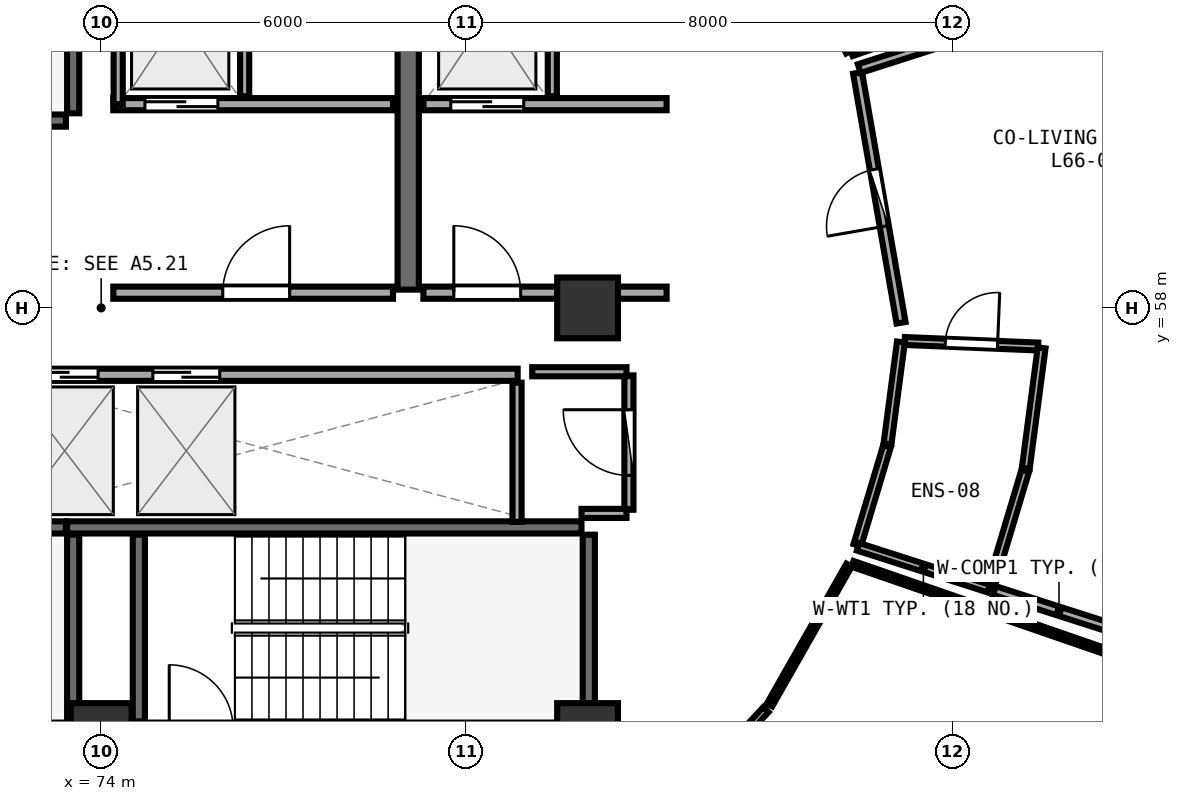
"""IFC4 building model, lengths in metres.
Left out: names, types, materials, properties, quantities, classifications, styles, units other than length and angle.
Written with IfcOpenShell. Run it as: python <this file> out.ifc"""

import sys

from ifc_helpers import new_model, si_unit, direction, frame, frame_2d, origin, origin_2d, place, context, subcontext, project, spatial, rectangle, extrude, element, fill, save


model = new_model("IFC4")
c1 = context("Model", 3, precision=1e-05, world=origin(), true_north=direction((0.0, 1.0)))
c2 = subcontext(c1, "Body", "Model", "MODEL_VIEW")
j1 = project(units=[si_unit("LENGTHUNIT", "METRE"), si_unit("PLANEANGLEUNIT", "RADIAN")], contexts=[c1])
p1 = place(None, origin())
s1 = spatial("IfcSite", under=j1, at=p1, CompositionType="ELEMENT")
p2 = place(p1, origin())
s2 = spatial("IfcBuilding", under=s1, at=p2, CompositionType="ELEMENT")
p3 = place(p2, frame((0.0, 0.0, 259.95)))
s3 = spatial("IfcBuildingStorey", under=s2, at=p3, CompositionType="ELEMENT", Elevation=259.95)
for number, where, z_axis, x_axis in (
    (1, (74.0, 51.0, 0.0), (0.0, 0.0, 1.0), (1.0, 0.0, 0.0)),
    (2, (82.0, 51.0, 0.0), (0.0, 0.0, 1.0), (1.0, 0.0, 0.0)),
    (3, (82.0, 58.0, 0.0), (0.0, 0.0, 1.0), (1.0, 0.0, 0.0)),
):
    element("IfcColumn", number, at=place(p3, frame(where, z_axis=z_axis, x_axis=x_axis)), inside=s3, PredefinedType="PILASTER", context=c2, shape_type="SweptSolid", body=[
        extrude(rectangle(XDim=1.0, YDim=1.0, at=origin_2d()), origin(), (0.0, 0.0, 1.0), 3.75),
    ])
p4 = place(p3, frame((66.26, 61.08, 0.0), z_axis=(0.0, 0.0, 1.0), x_axis=(1.0, 0.0, 0.0)))
e4 = element("IfcWall", 4, at=p4, inside=s3, PredefinedType="SHEAR", context=c2, shape_type="SweptSolid", body=[
    extrude(rectangle(XDim=7.16, YDim=0.2, at=frame_2d((3.58, 0.0))), origin(), (0.0, 0.0, 1.0), 3.49),
])
for number, where, z_axis, x_axis in (
    (5, (73.54, 61.2, 0.0), (0.0, 0.0, 1.0), (0.0, 1.0, 0.0)),
    (6, (82.02, 51.2, 0.0), (0.0, 0.0, 1.0), (0.0, 1.0, 0.0)),
):
    element("IfcWall", number, at=place(p3, frame(where, z_axis=z_axis, x_axis=x_axis)), inside=s3, PredefinedType="SHEAR", context=c2, shape_type="SweptSolid", body=[
        extrude(rectangle(XDim=3.07, YDim=0.2, at=frame_2d((1.535, 0.0))), origin(), (0.0, 0.0, 1.0), 3.49),
    ])
p5 = place(p3, frame((81.9, 54.39, 0.0), z_axis=(0.0, 0.0, 1.0), x_axis=(-1.0, 0.0, 0.0)))
e7 = element("IfcWall", 7, at=p5, inside=s3, PredefinedType="SHEAR", context=c2, shape_type="SweptSolid", body=[
    extrude(rectangle(XDim=8.46, YDim=0.2, at=frame_2d((4.23, 0.0))), origin(), (0.0, 0.0, 1.0), 3.49),
])
for number, where, z_axis, x_axis in (
    (8, (74.62, 54.27, 0.0), (0.0, 0.0, 1.0), (0.0, -1.0, 0.0)),
    (9, (73.54, 51.2, 0.0), (0.0, 0.0, 1.0), (0.0, 1.0, 0.0)),
):
    element("IfcWall", number, at=place(p3, frame(where, z_axis=z_axis, x_axis=x_axis)), inside=s3, PredefinedType="SHEAR", context=c2, shape_type="SweptSolid", body=[
        extrude(rectangle(XDim=3.07, YDim=0.2, at=frame_2d((1.535, 0.0))), origin(), (0.0, 0.0, 1.0), 3.49),
    ])
p6 = place(p3, frame((73.42, 54.39, 0.0), z_axis=(0.0, 0.0, 1.0), x_axis=(-1.0, 0.0, 0.0)))
e10 = element("IfcWall", 10, at=p6, inside=s3, PredefinedType="SHEAR", context=c2, shape_type="SweptSolid", body=[
    extrude(rectangle(XDim=7.16, YDim=0.2, at=frame_2d((3.58, 0.0))), origin(), (0.0, 0.0, 1.0), 3.49),
])
p7 = place(p3, frame((79.05, 58.3, 0.0), z_axis=(0.0, 0.0, 1.0), x_axis=(0.0, 1.0, 0.0)))
e11 = element("IfcWall", 11, at=p7, inside=s3, PredefinedType="SHEAR", context=c2, shape_type="SweptSolid", body=[
    extrude(rectangle(XDim=6.3, YDim=0.35, at=frame_2d((3.15, 0.0))), origin(), (0.0, 0.0, 1.0), 3.49),
])
p8 = place(p3, frame((74.2, 61.35, 0.0), z_axis=(0.0, 0.0, 1.0), x_axis=(1.0, 0.0, 0.0)))
e12 = element("IfcWall", 12, at=p8, inside=s3, PredefinedType="SOLIDWALL", context=c2, shape_type="SweptSolid", body=[
    extrude(rectangle(XDim=4.6, YDim=0.2, at=frame_2d((2.3, 0.0))), origin(), (0.0, 0.0, 1.0), 3.48),
])
p9 = place(p8, frame((0.52, 0.0, 0.0)))
e13 = element("IfcOpeningElement", 13, at=p9, cuts=e12, PredefinedType="OPENING", context=c2, shape_type="SweptSolid", body=[
    extrude(rectangle(XDim=1.2, YDim=2.15, at=frame_2d((0.6, 1.075))), frame((0.0, 0.11, 0.0), z_axis=(0.0, -1.0, 0.0), x_axis=(1.0, 0.0, 0.0)), (0.0, 0.0, 1.0), 0.22),
])
p10 = place(p3, frame((74.28, 61.35, 0.0), z_axis=(0.0, 0.0, 1.0), x_axis=(0.0, 1.0, 0.0)))
e14 = element("IfcWall", 14, at=p10, inside=s3, PredefinedType="PARTITIONING", context=c2, shape_type="SweptSolid", body=[
    extrude(rectangle(XDim=2.97, YDim=0.15, at=frame_2d((1.485, 0.0))), origin(), (0.0, 0.0, 1.0), 3.48),
])
p11 = place(p3, frame((76.36, 61.48, 0.0), z_axis=(0.0, 0.0, 1.0), x_axis=(0.0, 1.0, 0.0)))
e15 = element("IfcWall", 15, at=p11, inside=s3, PredefinedType="PARTITIONING", context=c2, shape_type="SweptSolid", body=[
    extrude(rectangle(XDim=2.84, YDim=0.15, at=frame_2d((1.42, 0.0))), origin(), (0.0, 0.0, 1.0), 3.48),
])
p12 = place(p3, frame((79.3, 61.35, 0.0), z_axis=(0.0, 0.0, 1.0), x_axis=(1.0, 0.0, 0.0)))
e16 = element("IfcWall", 16, at=p12, inside=s3, PredefinedType="SOLIDWALL", context=c2, shape_type="SweptSolid", body=[
    extrude(rectangle(XDim=4.0, YDim=0.2, at=frame_2d((2.0, 0.0))), origin(), (0.0, 0.0, 1.0), 2.775),
])
p13 = place(p12, frame((0.45, 0.0, 0.0)))
e17 = element("IfcOpeningElement", 17, at=p13, cuts=e16, PredefinedType="OPENING", context=c2, shape_type="SweptSolid", body=[
    extrude(rectangle(XDim=1.2, YDim=2.15, at=frame_2d((0.6, 1.075))), frame((0.0, 0.11, 0.0), z_axis=(0.0, -1.0, 0.0), x_axis=(1.0, 0.0, 0.0)), (0.0, 0.0, 1.0), 0.22),
])
p14 = place(p3, frame((81.42, 61.48, 0.0), z_axis=(0.0, 0.0, 1.0), x_axis=(0.0, 1.0, 0.0)))
e18 = element("IfcWall", 18, at=p14, inside=s3, PredefinedType="PARTITIONING", context=c2, shape_type="SweptSolid", body=[
    extrude(rectangle(XDim=2.84, YDim=0.15, at=frame_2d((1.42, 0.0))), origin(), (0.0, 0.0, 1.0), 3.48),
])
p15 = place(p3, frame((74.2, 58.25, 0.0), z_axis=(0.0, 0.0, 1.0), x_axis=(1.0, 0.0, 0.0)))
e19 = element("IfcWall", 19, at=p15, inside=s3, PredefinedType="SOLIDWALL", context=c2, shape_type="SweptSolid", body=[
    extrude(rectangle(XDim=4.6, YDim=0.2, at=frame_2d((2.3, 0.0))), origin(), (0.0, 0.0, 1.0), 3.48),
])
p16 = place(p15, frame((1.8, 0.0, 0.0)))
e20 = element("IfcOpeningElement", 20, at=p16, cuts=e19, PredefinedType="OPENING", context=c2, shape_type="SweptSolid", body=[
    extrude(rectangle(XDim=1.1, YDim=2.1, at=frame_2d((0.55, 1.05))), frame((0.0, 0.11, 0.0), z_axis=(0.0, -1.0, 0.0), x_axis=(1.0, 0.0, 0.0)), (0.0, 0.0, 1.0), 0.22),
])
p17 = place(p3, frame((79.3, 58.25, 0.0), z_axis=(0.0, 0.0, 1.0), x_axis=(1.0, 0.0, 0.0)))
e21 = element("IfcWall", 21, at=p17, inside=s3, PredefinedType="SOLIDWALL", context=c2, shape_type="SweptSolid", body=[
    extrude(rectangle(XDim=4.0, YDim=0.2, at=frame_2d((2.0, 0.0))), origin(), (0.0, 0.0, 1.0), 2.775),
])
p18 = place(p17, frame((0.5, 0.0, 0.0)))
e22 = element("IfcOpeningElement", 22, at=p18, cuts=e21, PredefinedType="OPENING", context=c2, shape_type="SweptSolid", body=[
    extrude(rectangle(XDim=1.1, YDim=2.1, at=frame_2d((0.55, 1.05))), frame((0.0, 0.11, 0.0), z_axis=(0.0, -1.0, 0.0), x_axis=(1.0, 0.0, 0.0)), (0.0, 0.0, 1.0), 0.22),
])
p19 = place(p3, frame((72.45, 56.9, 0.0), z_axis=(0.0, 0.0, 1.0), x_axis=(1.0, 0.0, 0.0)))
e23 = element("IfcWall", 23, at=p19, inside=s3, PredefinedType="SOLIDWALL", context=c2, shape_type="SweptSolid", body=[
    extrude(rectangle(XDim=8.4, YDim=0.2, at=frame_2d((4.2, 0.0))), origin(), (0.0, 0.0, 1.0), 3.48),
])
p20 = place(p19, frame((0.4, 0.0, 0.0)))
e24 = element("IfcOpeningElement", 24, at=p20, cuts=e23, PredefinedType="OPENING", context=c2, shape_type="SweptSolid", body=[
    extrude(rectangle(XDim=1.1, YDim=2.1, at=frame_2d((0.55, 1.05))), frame((0.0, 0.11, 0.0), z_axis=(0.0, -1.0, 0.0), x_axis=(1.0, 0.0, 0.0)), (0.0, 0.0, 1.0), 0.22),
])
p21 = place(p19, frame((2.4, 0.0, 0.0)))
e25 = element("IfcOpeningElement", 25, at=p21, cuts=e23, PredefinedType="OPENING", context=c2, shape_type="SweptSolid", body=[
    extrude(rectangle(XDim=1.1, YDim=2.1, at=frame_2d((0.55, 1.05))), frame((0.0, 0.11, 0.0), z_axis=(0.0, -1.0, 0.0), x_axis=(1.0, 0.0, 0.0)), (0.0, 0.0, 1.0), 0.22),
])
p22 = place(p3, frame((80.84, 54.48, 0.0), z_axis=(0.0, 0.0, 1.0), x_axis=(0.0, 1.0, 0.0)))
e26 = element("IfcWall", 26, at=p22, inside=s3, PredefinedType="PARTITIONING", context=c2, shape_type="SweptSolid", body=[
    extrude(rectangle(XDim=2.29, YDim=0.15, at=frame_2d((1.145, 0.0))), origin(), (0.0, 0.0, 1.0), 3.48),
])
p23 = place(p3, frame((82.68, 54.68, 0.0), z_axis=(0.0, 0.0, 1.0), x_axis=(0.0, 1.0, 0.0)))
e27 = element("IfcWall", 27, at=p23, inside=s3, PredefinedType="PARTITIONING", context=c2, shape_type="SweptSolid", body=[
    extrude(rectangle(XDim=2.21, YDim=0.15, at=frame_2d((1.105, 0.0))), origin(), (0.0, 0.0, 1.0), 3.48),
])
p24 = place(p23, frame((0.565, 0.0, 0.0)))
e28 = element("IfcOpeningElement", 28, at=p24, cuts=e27, PredefinedType="OPENING", context=c2, shape_type="SweptSolid", body=[
    extrude(rectangle(XDim=1.08, YDim=2.1, at=frame_2d((0.54, 1.05))), frame((0.0, 0.085, 0.0), z_axis=(0.0, -1.0, 0.0), x_axis=(1.0, 0.0, 0.0)), (0.0, 0.0, 1.0), 0.17),
])
p25 = place(p3, frame((83.118, 49.443, 0.0), z_axis=(0.0, 0.0, 1.0), x_axis=(0.681315269885, 0.731990097625, 0.0)))
e29 = element("IfcWall", 29, at=p25, inside=s3, PredefinedType="PARTITIONING", context=c2, shape_type="SweptSolid", body=[
    extrude(rectangle(XDim=2.664, YDim=0.12, at=frame_2d((1.332, 0.0))), origin(), (0.0, 0.0, 1.0), 3.075),
])
p26 = place(p25, frame((0.882, 0.0, 0.0)))
e30 = element("IfcOpeningElement", 30, at=p26, cuts=e29, PredefinedType="OPENING", context=c2, shape_type="SweptSolid", body=[
    extrude(rectangle(XDim=0.9, YDim=2.08, at=frame_2d((0.45, 1.04))), frame((0.0, 0.07, 0.0), z_axis=(0.0, -1.0, 0.0), x_axis=(1.0, 0.0, 0.0)), (0.0, 0.0, 1.0), 0.14),
])
p27 = place(p3, frame((87.216, 57.456, 0.0), z_axis=(0.0, 0.0, 1.0), x_axis=(0.999139994921, -0.041464087462, 0.0)))
e31 = element("IfcWall", 31, at=p27, inside=s3, PredefinedType="PLUMBINGWALL", context=c2, shape_type="SweptSolid", body=[
    extrude(rectangle(XDim=2.196, YDim=0.13, at=frame_2d((1.098, 0.0))), origin(), (0.0, 0.0, 1.0), 3.175),
])
p28 = place(p27, frame((0.668, 0.0, 0.0)))
e32 = element("IfcOpeningElement", 32, at=p28, cuts=e31, PredefinedType="OPENING", context=c2, shape_type="SweptSolid", body=[
    extrude(rectangle(XDim=0.86, YDim=2.05, at=frame_2d((0.43, 1.025))), frame((0.0, 0.075, 0.0), z_axis=(0.0, -1.0, 0.0), x_axis=(1.0, 0.0, 0.0)), (0.0, 0.0, 1.0), 0.15),
])
p29 = place(p3, frame((87.156, 57.755, 0.0), z_axis=(0.0, 0.0, 1.0), x_axis=(-0.171570913007, 0.985171772743, 0.0)))
e33 = element("IfcWall", 33, at=p29, inside=s3, PredefinedType="PARTITIONING", context=c2, shape_type="SweptSolid", body=[
    extrude(rectangle(XDim=4.171, YDim=0.15, at=frame_2d((2.085, 0.0))), origin(), (0.0, 0.0, 1.0), 3.075),
])
p30 = place(p29, frame((1.61, 0.0, 0.0)))
e34 = element("IfcOpeningElement", 34, at=p30, cuts=e33, PredefinedType="OPENING", context=c2, shape_type="SweptSolid", body=[
    extrude(rectangle(XDim=0.95, YDim=2.08, at=frame_2d((0.475, 1.04))), frame((0.0, 0.085, 0.0), z_axis=(0.0, -1.0, 0.0), x_axis=(1.0, 0.0, 0.0)), (0.0, 0.0, 1.0), 0.17),
])
p31 = place(p3, frame((81.9, 54.62, 0.0), z_axis=(0.0, 0.0, 1.0), x_axis=(1.0, 0.0, 0.0)))
e35 = element("IfcWall", 35, at=p31, inside=s3, PredefinedType="PARTITIONING", context=c2, shape_type="SweptSolid", body=[
    extrude(rectangle(XDim=0.74, YDim=0.15, at=frame_2d((0.37, 0.0))), origin(), (0.0, 0.0, 1.0), 2.775),
])
p32 = place(p3, frame((82.64, 56.95, 0.0), z_axis=(0.0, 0.0, 1.0), x_axis=(-1.0, 0.0, 0.0)))
e36 = element("IfcWall", 36, at=p32, inside=s3, PredefinedType="PARTITIONING", context=c2, shape_type="SweptSolid", body=[
    extrude(rectangle(XDim=1.55, YDim=0.15, at=frame_2d((0.775, 0.0))), origin(), (0.0, 0.0, 1.0), 2.775),
])
p33 = place(p3, frame((86.311, 62.214, 0.0), z_axis=(0.0, 0.0, 1.0), x_axis=(-0.457623641393, 0.889145996357, 0.0)))
e37 = element("IfcWall", 37, at=p33, inside=s3, PredefinedType="PLUMBINGWALL", context=c2, shape_type="SweptSolid", body=[
    extrude(rectangle(XDim=1.721, YDim=0.13, at=frame_2d((0.86, 0.0))), origin(), (0.0, 0.0, 1.0), 3.235),
])
p34 = place(p3, frame((88.467, 62.938, 0.0), z_axis=(0.0, 0.0, 1.0), x_axis=(-0.94520115701, -0.326488549244, 0.0)))
e38 = element("IfcWall", 38, at=p34, inside=s3, PredefinedType="PLUMBINGWALL", context=c2, shape_type="SweptSolid", body=[
    extrude(rectangle(XDim=2.251, YDim=0.13, at=frame_2d((1.126, 0.0))), origin(), (0.0, 0.0, 1.0), 3.175),
])
p35 = place(p3, frame((84.994, 51.472, 0.0), z_axis=(0.0, 0.0, 1.0), x_axis=(0.494277588427, 0.869304127207, 0.0)))
e39 = element("IfcWall", 39, at=p35, inside=s3, PredefinedType="PARTITIONING", context=c2, shape_type="SweptSolid", body=[
    extrude(rectangle(XDim=2.643, YDim=0.1, at=frame_2d((1.322, 0.0))), origin(), (0.0, 0.0, 1.0), 3.075),
])
p36 = place(p3, frame((86.358, 53.791, 0.0), z_axis=(0.0, 0.0, 1.0), x_axis=(0.945103281494, -0.326771766388, 0.0)))
e40 = element("IfcWall", 40, at=p36, inside=s3, PredefinedType="PARTITIONING", context=c2, shape_type="SweptSolid", body=[
    extrude(rectangle(XDim=4.604, YDim=0.1, at=frame_2d((2.302, 0.0))), origin(), (0.0, 0.0, 1.0), 3.075),
])
p37 = place(p3, frame((86.436, 54.096, 0.0), z_axis=(0.0, 0.0, 1.0), x_axis=(0.287308367232, 0.957838139833, 0.0)))
e41 = element("IfcWall", 41, at=p37, inside=s3, PredefinedType="PLUMBINGWALL", context=c2, shape_type="SweptSolid", body=[
    extrude(rectangle(XDim=1.7, YDim=0.13, at=frame_2d((0.85, 0.0))), origin(), (0.0, 0.0, 1.0), 3.48),
])
p38 = place(p3, frame((86.933, 55.764, 0.0), z_axis=(0.0, 0.0, 1.0), x_axis=(0.130686363399, 0.991423761275, 0.0)))
e42 = element("IfcWall", 42, at=p38, inside=s3, PredefinedType="PLUMBINGWALL", context=c2, shape_type="SweptSolid", body=[
    extrude(rectangle(XDim=1.689, YDim=0.13, at=frame_2d((0.844, 0.0))), origin(), (0.0, 0.0, 1.0), 3.48),
])
p39 = place(p3, frame((89.467, 57.342, 0.0), z_axis=(0.0, 0.0, 1.0), x_axis=(-0.130467152696, -0.991452632286, 0.0)))
e43 = element("IfcWall", 43, at=p39, inside=s3, PredefinedType="PLUMBINGWALL", context=c2, shape_type="SweptSolid", body=[
    extrude(rectangle(XDim=1.999, YDim=0.13, at=frame_2d((0.999, 0.0))), origin(), (0.0, 0.0, 1.0), 3.48),
])
p40 = place(p3, frame((89.198, 55.322, 0.0), z_axis=(0.0, 0.0, 1.0), x_axis=(-0.286890981069, -0.957963237803, 0.0)))
e44 = element("IfcWall", 44, at=p40, inside=s3, PredefinedType="PLUMBINGWALL", context=c2, shape_type="SweptSolid", body=[
    extrude(rectangle(XDim=2.01, YDim=0.13, at=frame_2d((1.005, 0.0))), origin(), (0.0, 0.0, 1.0), 3.48),
])
p41 = place(p3, frame((88.597, 53.383, 0.0), z_axis=(0.0, 0.0, 1.0), x_axis=(-0.952372601519, 0.304936760454, 0.0)))
e45 = element("IfcWall", 45, at=p41, inside=s3, PredefinedType="PLUMBINGWALL", context=c2, shape_type="SweptSolid", body=[
    extrude(rectangle(XDim=2.255, YDim=0.13, at=frame_2d((1.128, 0.0))), origin(), (0.0, 0.0, 1.0), 3.175),
])
p42 = place(p3, frame((86.468, 61.935, 0.0), z_axis=(0.0, 0.0, 1.0), x_axis=(0.95227750557, 0.305233602976, 0.0)))
e46 = element("IfcWall", 46, at=p42, inside=s3, PredefinedType="PARTITIONING", context=c2, shape_type="SweptSolid", body=[
    extrude(rectangle(XDim=4.565, YDim=0.15, at=frame_2d((2.283, 0.0))), origin(), (0.0, 0.0, 1.0), 3.175),
])
p43 = place(p3, frame((90.816, 52.671, 0.0), z_axis=(0.0, 0.0, 1.0), x_axis=(-0.952285550261, 0.305208503755, 0.0)))
e47 = element("IfcWall", 47, at=p43, inside=s3, PredefinedType="PARTITIONING", context=c2, shape_type="SweptSolid", body=[
    extrude(rectangle(XDim=2.231, YDim=0.15, at=frame_2d((1.115, 0.0))), origin(), (0.0, 0.0, 1.0), 3.235),
])
p44 = place(p9, origin())
e48 = element("IfcDoor", 48, at=p44, inside=s3, OperationType="DOUBLE_DOOR_SLIDING", PredefinedType="DOOR", context=c2, shape_type="SweptSolid", body=[
    extrude(rectangle(XDim=1.2, YDim=2.15, at=frame_2d((0.6, 1.075))), frame((0.0, 0.025, 0.0), z_axis=(0.0, -1.0, 0.0), x_axis=(1.0, 0.0, 0.0)), (0.0, 0.0, 1.0), 0.05),
])
fill(e13, e48)
p45 = place(p13, origin())
e49 = element("IfcDoor", 49, at=p45, inside=s3, OperationType="DOUBLE_DOOR_SLIDING", PredefinedType="DOOR", context=c2, shape_type="SweptSolid", body=[
    extrude(rectangle(XDim=1.2, YDim=2.15, at=frame_2d((0.6, 1.075))), frame((0.0, 0.025, 0.0), z_axis=(0.0, -1.0, 0.0), x_axis=(1.0, 0.0, 0.0)), (0.0, 0.0, 1.0), 0.05),
])
fill(e17, e49)
p46 = place(p16, frame((1.1, 0.0, 0.0), z_axis=(0.0, 0.0, 1.0), x_axis=(-1.0, 0.0, 0.0)))
e50 = element("IfcDoor", 50, at=p46, inside=s3, OperationType="SINGLE_SWING_LEFT", PredefinedType="DOOR", context=c2, shape_type="SweptSolid", body=[
    extrude(rectangle(XDim=1.1, YDim=2.1, at=frame_2d((0.55, 1.05))), frame((0.0, 0.025, 0.0), z_axis=(0.0, -1.0, 0.0), x_axis=(1.0, 0.0, 0.0)), (0.0, 0.0, 1.0), 0.05),
])
fill(e20, e50)
p47 = place(p18, frame((1.1, 0.0, 0.0), z_axis=(0.0, 0.0, 1.0), x_axis=(-1.0, 0.0, 0.0)))
e51 = element("IfcDoor", 51, at=p47, inside=s3, OperationType="SINGLE_SWING_RIGHT", PredefinedType="DOOR", context=c2, shape_type="SweptSolid", body=[
    extrude(rectangle(XDim=1.1, YDim=2.1, at=frame_2d((0.55, 1.05))), frame((0.0, 0.025, 0.0), z_axis=(0.0, -1.0, 0.0), x_axis=(1.0, 0.0, 0.0)), (0.0, 0.0, 1.0), 0.05),
])
fill(e22, e51)
p48 = place(p20, origin())
e52 = element("IfcDoor", 52, at=p48, inside=s3, OperationType="DOUBLE_DOOR_SLIDING", PredefinedType="DOOR", context=c2, shape_type="SweptSolid", body=[
    extrude(rectangle(XDim=1.1, YDim=2.1, at=frame_2d((0.55, 1.05))), frame((0.0, 0.025, 0.0), z_axis=(0.0, -1.0, 0.0), x_axis=(1.0, 0.0, 0.0)), (0.0, 0.0, 1.0), 0.05),
])
fill(e24, e52)
p49 = place(p21, origin())
e53 = element("IfcDoor", 53, at=p49, inside=s3, OperationType="DOUBLE_DOOR_SLIDING", PredefinedType="DOOR", context=c2, shape_type="SweptSolid", body=[
    extrude(rectangle(XDim=1.1, YDim=2.1, at=frame_2d((0.55, 1.05))), frame((0.0, 0.025, 0.0), z_axis=(0.0, -1.0, 0.0), x_axis=(1.0, 0.0, 0.0)), (0.0, 0.0, 1.0), 0.05),
])
fill(e25, e53)
p50 = place(p24, origin())
e54 = element("IfcDoor", 54, at=p50, inside=s3, OperationType="SINGLE_SWING_RIGHT", PredefinedType="DOOR", context=c2, shape_type="SweptSolid", body=[
    extrude(rectangle(XDim=1.08, YDim=2.1, at=frame_2d((0.54, 1.05))), frame((0.0, 0.025, 0.0), z_axis=(0.0, -1.0, 0.0), x_axis=(1.0, 0.0, 0.0)), (0.0, 0.0, 1.0), 0.05),
])
fill(e28, e54)
p51 = place(p28, origin())
e55 = element("IfcDoor", 55, at=p51, inside=s3, OperationType="SINGLE_SWING_RIGHT", PredefinedType="DOOR", context=c2, shape_type="SweptSolid", body=[
    extrude(rectangle(XDim=0.86, YDim=2.05, at=frame_2d((0.43, 1.025))), frame((0.0, 0.025, 0.0), z_axis=(0.0, -1.0, 0.0), x_axis=(1.0, 0.0, 0.0)), (0.0, 0.0, 1.0), 0.05),
])
fill(e32, e55)
p52 = place(p30, origin())
e56 = element("IfcDoor", 56, at=p52, inside=s3, OperationType="SINGLE_SWING_LEFT", PredefinedType="DOOR", context=c2, shape_type="SweptSolid", body=[
    extrude(rectangle(XDim=0.95, YDim=2.08, at=frame_2d((0.475, 1.04))), frame((0.0, 0.025, 0.0), z_axis=(0.0, -1.0, 0.0), x_axis=(1.0, 0.0, 0.0)), (0.0, 0.0, 1.0), 0.05),
])
fill(e34, e56)
save(model, sys.argv[1])
